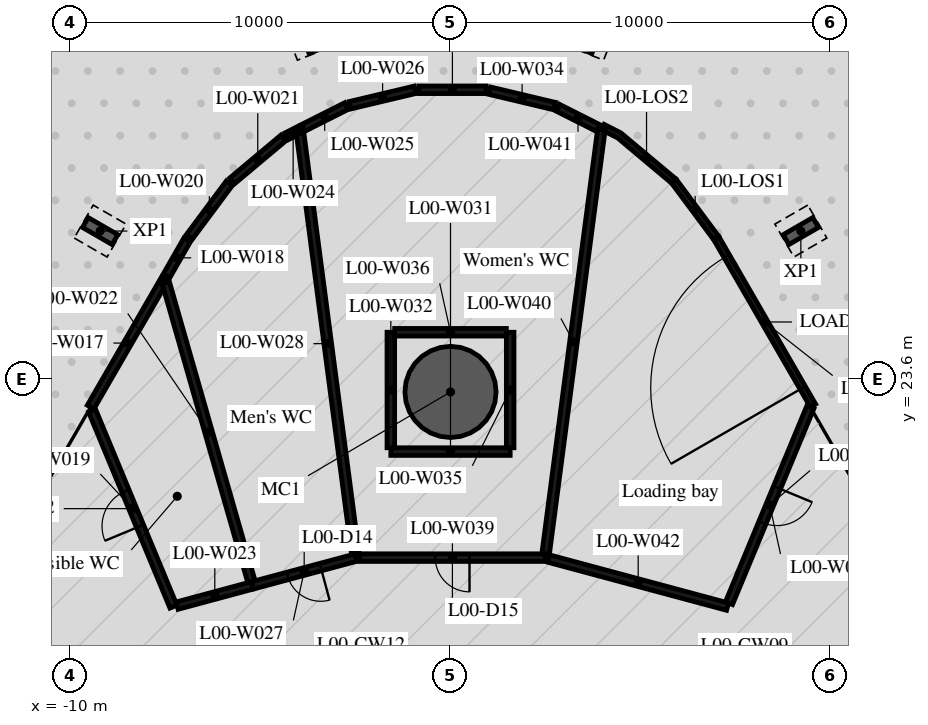
"""IFC4 building model, lengths in metres.
Left out: names, types, materials, properties, quantities, classifications, styles, units other than length and angle.
Written with IfcOpenShell. Run it as: python <this file> out.ifc"""

import sys

from ifc_helpers import new_model, si_unit, direction, frame, frame_2d, origin, origin_2d, place, context, subcontext, project, spatial, polyline, rectangle, hollow_circle, i_section, outline, extrude, element, fill, save


model = new_model("IFC4")
c1 = context("Model", 3, precision=1e-05, world=origin(), true_north=direction((0.0, 1.0)))
c2 = subcontext(c1, "Body", "Model", "MODEL_VIEW")
j1 = project(units=[si_unit("LENGTHUNIT", "METRE"), si_unit("PLANEANGLEUNIT", "RADIAN")], contexts=[c1])
p1 = place(None, origin())
s1 = spatial("IfcSite", under=j1, at=p1, CompositionType="ELEMENT")
p2 = place(p1, origin())
s2 = spatial("IfcBuilding", under=s1, at=p2, CompositionType="ELEMENT")
p3 = place(p2, origin())
s3 = spatial("IfcBuildingStorey", under=s2, at=p3, CompositionType="ELEMENT", Elevation=0.0)
p4 = place(p3, frame((0.0, 23.26, -0.42), z_axis=(0.0, 0.0, 1.0), x_axis=(1.0, 0.0, 0.0)))
e1 = element("IfcColumn", 1, at=p4, inside=s3, PredefinedType="COLUMN", context=c2, shape_type="SweptSolid", body=[
    extrude(hollow_circle(Radius=1.2, WallThickness=0.06, at=origin_2d()), origin(), (0.0, 0.0, 1.0), 9.04),
])
for number, where, z_axis, x_axis in (
    (2, (9.219, 27.493, -0.42), (0.0, 0.0, 1.0), (0.5, -0.866, 0.0)),
    (3, (3.748, 32.639, -0.42), (0.0, 0.0, 1.0), (0.929, -0.371, 0.0)),
    (4, (-3.748, 32.639, -0.42), (0.0, 0.0, 1.0), (0.929, 0.371, 0.0)),
    (5, (-9.219, 27.493, -0.42), (0.0, 0.0, 1.0), (0.5, 0.866, 0.0)),
):
    element("IfcColumn", number, at=place(p3, frame(where, z_axis=z_axis, x_axis=x_axis)), inside=s3, PredefinedType="COLUMN", context=c2, shape_type="SweptSolid", body=[
        extrude(i_section(OverallWidth=0.3, OverallDepth=0.9, WebThickness=0.019, FlangeThickness=0.035, FilletRadius=0.03, at=origin_2d()), origin(), (0.0, 0.0, 1.0), 9.04),
    ])
p5 = place(p3, frame((9.538, 22.899, 0.0), z_axis=(0.0, 0.0, 1.0), x_axis=(-0.499994189038, 0.866028758719, 0.0)))
e6 = element("IfcWall", 6, at=p5, inside=s3, PredefinedType="STANDARD", context=c2, shape_type="SweptSolid", body=[
    extrude(rectangle(XDim=5.081, YDim=0.16, at=frame_2d((2.541, 0.0))), origin(), (0.0, 0.0, 1.0), 8.62),
])
p6 = place(p5, frame((0.541, 0.0, 0.0)))
e7 = element("IfcOpeningElement", 7, at=p6, cuts=e6, PredefinedType="OPENING", context=c2, shape_type="SweptSolid", body=[
    extrude(rectangle(XDim=4.0, YDim=4.5, at=frame_2d((2.0, 2.25))), frame((0.0, 0.09, 0.0), z_axis=(0.0, -1.0, 0.0), x_axis=(1.0, 0.0, 0.0)), (0.0, 0.0, 1.0), 0.18),
])
p7 = place(p3, origin())
e8 = element("IfcWall", 8, at=p7, inside=s3, PredefinedType="STANDARD", context=c2, shape_type="SweptSolid", body=[
    extrude(outline(polyline([(5.819, 28.75), (6.928, 27.26), (7.057, 27.355), (5.947, 28.845), (5.819, 28.75)])), origin(), (0.0, 0.0, 1.0), 8.62),
])
p8 = place(p3, origin())
e9 = element("IfcWall", 9, at=p8, inside=s3, PredefinedType="STANDARD", context=c2, shape_type="SweptSolid", body=[
    extrude(outline(polyline([(3.97, 30.157), (4.396, 29.944), (5.819, 28.75), (5.922, 28.872), (4.483, 30.076), (4.042, 30.301), (3.97, 30.157)])), origin(), (0.0, 0.0, 1.0), 8.62),
])
p9 = place(p3, frame((-9.47, 22.86, 0.0), z_axis=(0.0, 0.0, 1.0), x_axis=(0.500838510154, 0.865540748172, 0.0)))
e10 = element("IfcWall", 10, at=p9, inside=s3, PredefinedType="PARTITIONING", context=c2, shape_type="SweptSolid", body=[
    extrude(rectangle(XDim=3.893, YDim=0.2, at=frame_2d((1.947, 0.0))), origin(), (0.0, 0.0, 1.0), 8.62),
])
p10 = place(p3, frame((-7.47, 26.317, 0.0), z_axis=(0.0, 0.0, 1.0), x_axis=(0.496985178768, 0.867759028812, 0.0)))
e11 = element("IfcWall", 11, at=p10, inside=s3, PredefinedType="PARTITIONING", context=c2, shape_type="SweptSolid", body=[
    extrude(rectangle(XDim=1.087, YDim=0.2, at=frame_2d((0.543, 0.0))), origin(), (0.0, 0.0, 1.0), 8.23),
])
p11 = place(p3, frame((-7.29, 17.61, 0.0), z_axis=(0.0, 0.0, 1.0), x_axis=(-0.38349447123, 0.923543171994, 0.0)))
e12 = element("IfcWall", 12, at=p11, inside=s3, PredefinedType="PARTITIONING", context=c2, shape_type="SweptSolid", body=[
    extrude(rectangle(XDim=5.584, YDim=0.2, at=frame_2d((2.792, 0.0))), origin(), (0.0, 0.0, 1.0), 8.62),
])
p12 = place(p11, frame((2.292, 0.0, 0.0)))
e13 = element("IfcOpeningElement", 13, at=p12, cuts=e12, PredefinedType="OPENING", context=c2, shape_type="SweptSolid", body=[
    extrude(rectangle(XDim=1.0, YDim=2.1, at=frame_2d((0.5, 1.05))), frame((0.0, 0.11, 0.0), z_axis=(0.0, -1.0, 0.0), x_axis=(1.0, 0.0, 0.0)), (0.0, 0.0, 1.0), 0.22),
])
p13 = place(p3, frame((-6.87, 27.34, 0.0), z_axis=(0.0, 0.0, 1.0), x_axis=(0.597397279316, 0.801945441202, 0.0)))
e14 = element("IfcWall", 14, at=p13, inside=s3, PredefinedType="PARTITIONING", context=c2, shape_type="SweptSolid", body=[
    extrude(rectangle(XDim=1.758, YDim=0.2, at=frame_2d((0.879, 0.0))), origin(), (0.0, 0.0, 1.0), 8.62),
])
p14 = place(p3, frame((-5.743, 28.814, 0.0), z_axis=(0.0, 0.0, 1.0), x_axis=(0.766494536171, 0.642250827964, 0.0)))
e15 = element("IfcWall", 15, at=p14, inside=s3, PredefinedType="PARTITIONING", context=c2, shape_type="SweptSolid", body=[
    extrude(rectangle(XDim=1.753, YDim=0.2, at=frame_2d((0.876, 0.0))), origin(), (0.0, 0.0, 1.0), 8.62),
])
p15 = place(p3, frame((-5.238, 18.266, 0.0), z_axis=(0.0, 0.0, 1.0), x_axis=(-0.275508995385, 0.961298493425, 0.0)))
e16 = element("IfcWall", 16, at=p15, inside=s3, PredefinedType="PARTITIONING", context=c2, shape_type="SweptSolid", body=[
    extrude(rectangle(XDim=8.184, YDim=0.2, at=frame_2d((4.092, 0.0))), origin(), (0.0, 0.0, 1.0), 8.62),
])
p16 = place(p3, frame((-5.21, 18.17, 0.0), z_axis=(0.0, 0.0, 1.0), x_axis=(-0.965622643893, -0.259947897858, 0.0)))
e17 = element("IfcWall", 17, at=p16, inside=s3, PredefinedType="PARTITIONING", context=c2, shape_type="SweptSolid", body=[
    extrude(rectangle(XDim=2.054, YDim=0.2, at=frame_2d((1.027, 0.0))), origin(), (0.0, 0.0, 1.0), 8.62),
])
p17 = place(p3, frame((-4.311, 29.986, 0.0), z_axis=(0.0, 0.0, 1.0), x_axis=(0.890440422172, 0.455099829227, 0.0)))
e18 = element("IfcWall", 18, at=p17, inside=s3, PredefinedType="PARTITIONING", context=c2, shape_type="SweptSolid", body=[
    extrude(rectangle(XDim=0.383, YDim=0.2, at=frame_2d((0.191, 0.0))), origin(), (0.0, 0.0, 1.0), 8.62),
])
p18 = place(p3, frame((-3.881, 30.205, 0.0), z_axis=(0.0, 0.0, 1.0), x_axis=(0.892969867653, 0.450116446559, 0.0)))
e19 = element("IfcWall", 19, at=p18, inside=s3, PredefinedType="PARTITIONING", context=c2, shape_type="SweptSolid", body=[
    extrude(rectangle(XDim=1.277, YDim=0.2, at=frame_2d((0.639, 0.0))), origin(), (0.0, 0.0, 1.0), 8.23),
])
p19 = place(p3, frame((-2.643, 30.803, 0.0), z_axis=(0.0, 0.0, 1.0), x_axis=(0.972945902967, 0.231033049365, 0.0)))
e20 = element("IfcWall", 20, at=p19, inside=s3, PredefinedType="PARTITIONING", context=c2, shape_type="SweptSolid", body=[
    extrude(rectangle(XDim=1.76, YDim=0.2, at=frame_2d((0.88, 0.0))), origin(), (0.0, 0.0, 1.0), 8.62),
])
p20 = place(p3, frame((-2.49, 18.9, 0.0), z_axis=(0.0, 0.0, 1.0), x_axis=(-0.965822195796, -0.25920549012, 0.0)))
e21 = element("IfcWall", 21, at=p20, inside=s3, PredefinedType="PARTITIONING", context=c2, shape_type="SweptSolid", body=[
    extrude(rectangle(XDim=2.816, YDim=0.2, at=frame_2d((1.408, 0.0))), origin(), (0.0, 0.0, 1.0), 8.62),
])
p21 = place(p20, frame((0.958, 0.0, 0.0)))
e22 = element("IfcOpeningElement", 22, at=p21, cuts=e21, PredefinedType="OPENING", context=c2, shape_type="SweptSolid", body=[
    extrude(rectangle(XDim=0.9, YDim=2.1, at=frame_2d((0.45, 1.05))), frame((0.0, 0.11, 0.0), z_axis=(0.0, -1.0, 0.0), x_axis=(1.0, 0.0, 0.0)), (0.0, 0.0, 1.0), 0.22),
])
p22 = place(p3, frame((-2.503, 18.999, 0.0), z_axis=(0.0, 0.0, 1.0), x_axis=(-0.130334505776, 0.991470078522, 0.0)))
e23 = element("IfcWall", 23, at=p22, inside=s3, PredefinedType="PARTITIONING", context=c2, shape_type="SweptSolid", body=[
    extrude(rectangle(XDim=11.157, YDim=0.2, at=frame_2d((5.578, 0.0))), origin(), (0.0, 0.0, 1.0), 8.62),
])
p23 = place(p3, frame((-1.57, 21.69, 0.0), z_axis=(0.0, 0.0, 1.0), x_axis=(1.0, 0.0, 0.0)))
e24 = element("IfcWall", 24, at=p23, inside=s3, PredefinedType="PARTITIONING", context=c2, shape_type="SweptSolid", body=[
    extrude(rectangle(XDim=3.14, YDim=0.2, at=frame_2d((1.57, 0.0))), origin(), (0.0, 0.0, 1.0), 8.62),
])
p24 = place(p3, frame((-1.57, 24.83, 0.0), z_axis=(0.0, 0.0, 1.0), x_axis=(0.0, -1.0, 0.0)))
e25 = element("IfcWall", 25, at=p24, inside=s3, PredefinedType="PARTITIONING", context=c2, shape_type="SweptSolid", body=[
    extrude(rectangle(XDim=3.04, YDim=0.2, at=frame_2d((1.52, 0.0))), origin(), (0.0, 0.0, 1.0), 8.62),
])
p25 = place(p3, frame((-0.83, 31.21, 0.0), z_axis=(0.0, 0.0, 1.0), x_axis=(1.0, 0.0, 0.0)))
e26 = element("IfcWall", 26, at=p25, inside=s3, PredefinedType="PARTITIONING", context=c2, shape_type="SweptSolid", body=[
    extrude(rectangle(XDim=1.76, YDim=0.2, at=frame_2d((0.88, 0.0))), origin(), (0.0, 0.0, 1.0), 8.62),
])
p26 = place(p3, frame((1.027, 31.187, 0.0), z_axis=(0.0, 0.0, 1.0), x_axis=(0.972938499499, -0.231064225255, 0.0)))
e27 = element("IfcWall", 27, at=p26, inside=s3, PredefinedType="PARTITIONING", context=c2, shape_type="SweptSolid", body=[
    extrude(rectangle(XDim=1.76, YDim=0.2, at=frame_2d((0.88, 0.0))), origin(), (0.0, 0.0, 1.0), 8.62),
])
p27 = place(p3, frame((1.57, 21.79, 0.0), z_axis=(0.0, 0.0, 1.0), x_axis=(0.0, 1.0, 0.0)))
e28 = element("IfcWall", 28, at=p27, inside=s3, PredefinedType="PARTITIONING", context=c2, shape_type="SweptSolid", body=[
    extrude(rectangle(XDim=3.04, YDim=0.2, at=frame_2d((1.52, 0.0))), origin(), (0.0, 0.0, 1.0), 8.62),
])
p28 = place(p3, frame((1.47, 24.83, 0.0), z_axis=(0.0, 0.0, 1.0), x_axis=(-1.0, 0.0, 0.0)))
e29 = element("IfcWall", 29, at=p28, inside=s3, PredefinedType="PARTITIONING", context=c2, shape_type="SweptSolid", body=[
    extrude(rectangle(XDim=2.94, YDim=0.2, at=frame_2d((1.47, 0.0))), origin(), (0.0, 0.0, 1.0), 8.62),
])
p29 = place(p3, frame((2.49, 18.9, 0.0), z_axis=(0.0, 0.0, 1.0), x_axis=(-1.0, 0.0, 0.0)))
e30 = element("IfcWall", 30, at=p29, inside=s3, PredefinedType="PARTITIONING", context=c2, shape_type="SweptSolid", body=[
    extrude(rectangle(XDim=4.88, YDim=0.2, at=frame_2d((2.44, 0.0))), origin(), (0.0, 0.0, 1.0), 8.62),
])
p30 = place(p29, frame((1.99, 0.0, 0.0)))
e31 = element("IfcOpeningElement", 31, at=p30, cuts=e30, PredefinedType="OPENING", context=c2, shape_type="SweptSolid", body=[
    extrude(rectangle(XDim=0.9, YDim=2.1, at=frame_2d((0.45, 1.05))), frame((0.0, 0.11, 0.0), z_axis=(0.0, -1.0, 0.0), x_axis=(1.0, 0.0, 0.0)), (0.0, 0.0, 1.0), 0.22),
])
p31 = place(p3, frame((2.503, 18.999, 0.0), z_axis=(0.0, 0.0, 1.0), x_axis=(0.130326594714, 0.991471118445, 0.0)))
e32 = element("IfcWall", 32, at=p31, inside=s3, PredefinedType="PARTITIONING", context=c2, shape_type="SweptSolid", body=[
    extrude(rectangle(XDim=11.257, YDim=0.2, at=frame_2d((5.628, 0.0))), origin(), (0.0, 0.0, 1.0), 8.62),
])
p32 = place(p3, frame((2.829, 30.735, 0.0), z_axis=(0.0, 0.0, 1.0), x_axis=(0.892929152467, -0.45019721087, 0.0)))
e33 = element("IfcWall", 33, at=p32, inside=s3, PredefinedType="PARTITIONING", context=c2, shape_type="SweptSolid", body=[
    extrude(rectangle(XDim=1.177, YDim=0.2, at=frame_2d((0.589, 0.0))), origin(), (0.0, 0.0, 1.0), 8.23),
])
p33 = place(p3, frame((7.29, 17.61, 0.0), z_axis=(0.0, 0.0, 1.0), x_axis=(-0.965738104821, 0.259518617631, 0.0)))
e34 = element("IfcWall", 34, at=p33, inside=s3, PredefinedType="PARTITIONING", context=c2, shape_type="SweptSolid", body=[
    extrude(rectangle(XDim=4.87, YDim=0.2, at=frame_2d((2.435, 0.0))), origin(), (0.0, 0.0, 1.0), 8.62),
])
p34 = place(p3, frame((9.47, 22.86, 0.0), z_axis=(0.0, 0.0, 1.0), x_axis=(-0.383478988028, -0.923549601127, 0.0)))
e35 = element("IfcWall", 35, at=p34, inside=s3, PredefinedType="PARTITIONING", context=c2, shape_type="SweptSolid", body=[
    extrude(rectangle(XDim=5.585, YDim=0.2, at=frame_2d((2.792, 0.0))), origin(), (0.0, 0.0, 1.0), 8.62),
])
p35 = place(p34, frame((2.292, 0.0, 0.0)))
e36 = element("IfcOpeningElement", 36, at=p35, cuts=e35, PredefinedType="OPENING", context=c2, shape_type="SweptSolid", body=[
    extrude(rectangle(XDim=1.0, YDim=2.1, at=frame_2d((0.5, 1.05))), frame((0.0, 0.11, 0.0), z_axis=(0.0, -1.0, 0.0), x_axis=(1.0, 0.0, 0.0)), (0.0, 0.0, 1.0), 0.22),
])
p36 = place(p6, origin())
e37 = element("IfcDoor", 37, at=p36, inside=s3, OperationType="ROLLINGUP", PredefinedType="DOOR", context=c2, shape_type="SweptSolid", body=[
    extrude(rectangle(XDim=4.0, YDim=4.5, at=frame_2d((2.0, 2.25))), frame((0.0, 0.025, 0.0), z_axis=(0.0, -1.0, 0.0), x_axis=(1.0, 0.0, 0.0)), (0.0, 0.0, 1.0), 0.05),
])
fill(e7, e37)
p37 = place(p12, origin())
e38 = element("IfcDoor", 38, at=p37, inside=s3, OperationType="SINGLE_SWING_LEFT", PredefinedType="DOOR", context=c2, shape_type="SweptSolid", body=[
    extrude(rectangle(XDim=1.0, YDim=2.1, at=frame_2d((0.5, 1.05))), frame((0.0, 0.025, 0.0), z_axis=(0.0, -1.0, 0.0), x_axis=(1.0, 0.0, 0.0)), (0.0, 0.0, 1.0), 0.05),
])
fill(e13, e38)
p38 = place(p35, origin())
e39 = element("IfcDoor", 39, at=p38, inside=s3, OperationType="SINGLE_SWING_LEFT", PredefinedType="DOOR", context=c2, shape_type="SweptSolid", body=[
    extrude(rectangle(XDim=1.0, YDim=2.1, at=frame_2d((0.5, 1.05))), frame((0.0, 0.025, 0.0), z_axis=(0.0, -1.0, 0.0), x_axis=(1.0, 0.0, 0.0)), (0.0, 0.0, 1.0), 0.05),
])
fill(e36, e39)
p39 = place(p21, origin())
e40 = element("IfcDoor", 40, at=p39, inside=s3, OperationType="SINGLE_SWING_LEFT", PredefinedType="DOOR", context=c2, shape_type="SweptSolid", body=[
    extrude(rectangle(XDim=0.9, YDim=2.1, at=frame_2d((0.45, 1.05))), frame((0.0, 0.025, 0.0), z_axis=(0.0, -1.0, 0.0), x_axis=(1.0, 0.0, 0.0)), (0.0, 0.0, 1.0), 0.05),
])
fill(e22, e40)
p40 = place(p30, origin())
e41 = element("IfcDoor", 41, at=p40, inside=s3, OperationType="SINGLE_SWING_LEFT", PredefinedType="DOOR", context=c2, shape_type="SweptSolid", body=[
    extrude(rectangle(XDim=0.9, YDim=2.1, at=frame_2d((0.45, 1.05))), frame((0.0, 0.025, 0.0), z_axis=(0.0, -1.0, 0.0), x_axis=(1.0, 0.0, 0.0)), (0.0, 0.0, 1.0), 0.05),
])
fill(e31, e41)
save(model, sys.argv[1])
